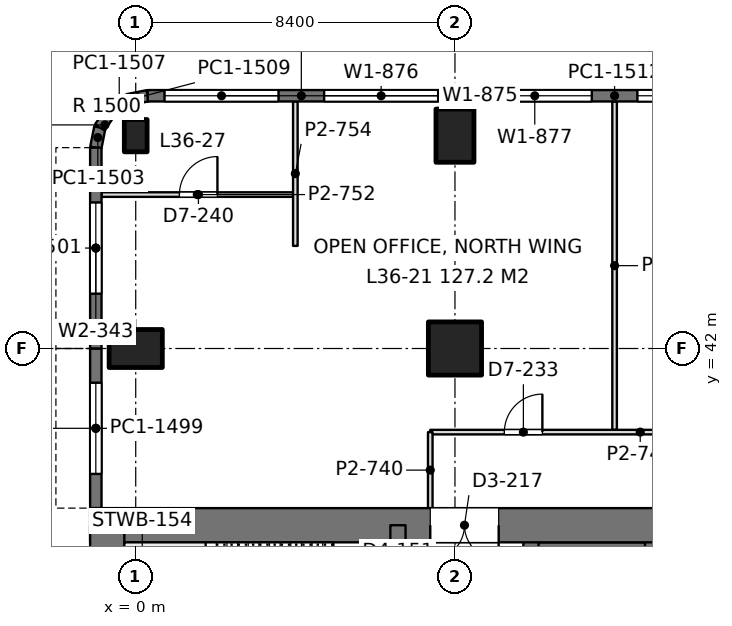
"""IFC4 building model, lengths in metres.
Left out: names, types, materials, properties, quantities, classifications, styles, units other than length and angle.
Written with IfcOpenShell. Run it as: python <this file> out.ifc"""

import sys

from ifc_helpers import new_model, si_unit, direction, frame, frame_2d, origin, origin_2d, place, context, subcontext, project, spatial, rectangle, extrude, element, fill, save


model = new_model("IFC4")
c1 = context("Model", 3, precision=1e-05, world=origin(), true_north=direction((0.0, 1.0)))
c2 = subcontext(c1, "Body", "Model", "MODEL_VIEW")
j1 = project(units=[si_unit("LENGTHUNIT", "METRE"), si_unit("PLANEANGLEUNIT", "RADIAN")], contexts=[c1])
p1 = place(None, origin())
s1 = spatial("IfcSite", under=j1, at=p1, CompositionType="ELEMENT")
p2 = place(p1, origin())
s2 = spatial("IfcBuilding", under=s1, at=p2, CompositionType="ELEMENT")
p3 = place(p2, frame((0.0, 0.0, 159.6)))
s3 = spatial("IfcBuildingStorey", under=s2, at=p3, CompositionType="ELEMENT", Elevation=159.6)
p4 = place(p3, frame((0.0, 42.0, 0.0), z_axis=(0.0, 0.0, 1.0), x_axis=(0.0, 1.0, 0.0)))
e1 = element("IfcColumn", 1, at=p4, inside=s3, PredefinedType="COLUMN", context=c2, shape_type="SweptSolid", body=[
    extrude(rectangle(XDim=1.0, YDim=1.4, at=origin_2d()), origin(), (0.0, 0.0, 1.0), 4.2),
])
p5 = place(p3, frame((0.0, 47.6, 0.0), z_axis=(0.0, 0.0, 1.0), x_axis=(1.0, 0.0, 0.0)))
e2 = element("IfcColumn", 2, at=p5, inside=s3, PredefinedType="COLUMN", context=c2, shape_type="SweptSolid", body=[
    extrude(rectangle(XDim=0.6, YDim=0.85, at=origin_2d()), origin(), (0.0, 0.0, 1.0), 4.2),
])
p6 = place(p3, frame((8.4, 42.0, 0.0), z_axis=(0.0, 0.0, 1.0), x_axis=(1.0, 0.0, 0.0)))
e3 = element("IfcColumn", 3, at=p6, inside=s3, PredefinedType="COLUMN", context=c2, shape_type="SweptSolid", body=[
    extrude(rectangle(XDim=1.4, YDim=1.4, at=origin_2d()), origin(), (0.0, 0.0, 1.0), 4.2),
])
p7 = place(p3, frame((8.4, 47.6, 0.0), z_axis=(0.0, 0.0, 1.0), x_axis=(1.0, 0.0, 0.0)))
e4 = element("IfcColumn", 4, at=p7, inside=s3, PredefinedType="COLUMN", context=c2, shape_type="SweptSolid", body=[
    extrude(rectangle(XDim=1.0, YDim=1.4, at=origin_2d()), origin(), (0.0, 0.0, 1.0), 4.2),
])
p8 = place(p3, frame((-1.2, 37.35, 0.0), z_axis=(0.0, 0.0, 1.0), x_axis=(1.0, 0.0, 0.0)))
e5 = element("IfcWall", 5, at=p8, inside=s3, PredefinedType="SHEAR", context=c2, shape_type="SweptSolid", body=[
    extrude(rectangle(XDim=18.0, YDim=0.9, at=frame_2d((9.0, 0.0))), origin(), (0.0, 0.0, 1.0), 4.2),
])
p9 = place(p8, frame((8.95, 0.0, 0.0)))
e6 = element("IfcOpeningElement", 6, at=p9, cuts=e5, PredefinedType="OPENING", context=c2, shape_type="SweptSolid", body=[
    extrude(rectangle(XDim=1.8, YDim=2.4, at=frame_2d((0.9, 1.2))), frame((0.0, 0.46, 0.0), z_axis=(0.0, -1.0, 0.0), x_axis=(1.0, 0.0, 0.0)), (0.0, 0.0, 1.0), 0.92),
])
p10 = place(p3, frame((-0.75, 13.05, 0.0), z_axis=(0.0, 0.0, 1.0), x_axis=(0.0, 1.0, 0.0)))
e7 = element("IfcWall", 7, at=p10, inside=s3, PredefinedType="SHEAR", context=c2, shape_type="SweptSolid", body=[
    extrude(rectangle(XDim=24.3, YDim=0.9, at=frame_2d((12.15, 0.0))), origin(), (0.0, 0.0, 1.0), 4.2),
])
p11 = place(p3, frame((6.9, 13.05, 0.0), z_axis=(0.0, 0.0, 1.0), x_axis=(0.0, 1.0, 0.0)))
e8 = element("IfcWall", 8, at=p11, inside=s3, PredefinedType="SHEAR", context=c2, shape_type="SweptSolid", body=[
    extrude(rectangle(XDim=24.3, YDim=0.4, at=frame_2d((12.15, 0.0))), origin(), (0.0, 0.0, 1.0), 4.2),
])
p12 = place(p11, frame((1.3, 0.0, 0.0)))
e9 = element("IfcOpeningElement", 9, at=p12, cuts=e8, PredefinedType="OPENING", context=c2, shape_type="SweptSolid", body=[
    extrude(rectangle(XDim=1.0, YDim=2.2, at=frame_2d((0.5, 1.1))), frame((0.0, 0.21, 0.0), z_axis=(0.0, -1.0, 0.0), x_axis=(1.0, 0.0, 0.0)), (0.0, 0.0, 1.0), 0.42),
])
p13 = place(p11, frame((22.0, 0.0, 0.0)))
e10 = element("IfcOpeningElement", 10, at=p13, cuts=e8, PredefinedType="OPENING", context=c2, shape_type="SweptSolid", body=[
    extrude(rectangle(XDim=1.0, YDim=2.2, at=frame_2d((0.5, 1.1))), frame((0.0, 0.21, 0.0), z_axis=(0.0, -1.0, 0.0), x_axis=(1.0, 0.0, 0.0)), (0.0, 0.0, 1.0), 0.42),
])
p14 = place(p11, frame((5.55, 0.0, 0.0)))
e11 = element("IfcOpeningElement", 11, at=p14, cuts=e8, PredefinedType="OPENING", context=c2, shape_type="SweptSolid", body=[
    extrude(rectangle(XDim=1.0, YDim=2.2, at=frame_2d((0.5, 1.1))), frame((0.0, 0.21, 0.0), z_axis=(0.0, -1.0, 0.0), x_axis=(1.0, 0.0, 0.0)), (0.0, 0.0, 1.0), 0.42),
])
p15 = place(p11, frame((9.55, 0.0, 0.0)))
e12 = element("IfcOpeningElement", 12, at=p15, cuts=e8, PredefinedType="OPENING", context=c2, shape_type="SweptSolid", body=[
    extrude(rectangle(XDim=1.0, YDim=2.2, at=frame_2d((0.5, 1.1))), frame((0.0, 0.21, 0.0), z_axis=(0.0, -1.0, 0.0), x_axis=(1.0, 0.0, 0.0)), (0.0, 0.0, 1.0), 0.42),
])
p16 = place(p11, frame((12.8, 0.0, 0.0)))
e13 = element("IfcOpeningElement", 13, at=p16, cuts=e8, PredefinedType="OPENING", context=c2, shape_type="SweptSolid", body=[
    extrude(rectangle(XDim=1.1, YDim=2.2, at=frame_2d((0.55, 1.1))), frame((0.0, 0.21, 0.0), z_axis=(0.0, -1.0, 0.0), x_axis=(1.0, 0.0, 0.0)), (0.0, 0.0, 1.0), 0.42),
])
p17 = place(p11, frame((15.538, 0.0, 0.0)))
e14 = element("IfcOpeningElement", 14, at=p17, cuts=e8, PredefinedType="OPENING", context=c2, shape_type="SweptSolid", body=[
    extrude(rectangle(XDim=1.1, YDim=2.2, at=frame_2d((0.55, 1.1))), frame((0.0, 0.21, 0.0), z_axis=(0.0, -1.0, 0.0), x_axis=(1.0, 0.0, 0.0)), (0.0, 0.0, 1.0), 0.42),
])
p18 = place(p11, frame((18.262, 0.0, 0.0)))
e15 = element("IfcOpeningElement", 15, at=p18, cuts=e8, PredefinedType="OPENING", context=c2, shape_type="SweptSolid", body=[
    extrude(rectangle(XDim=1.1, YDim=2.2, at=frame_2d((0.55, 1.1))), frame((0.0, 0.21, 0.0), z_axis=(0.0, -1.0, 0.0), x_axis=(1.0, 0.0, 0.0)), (0.0, 0.0, 1.0), 0.42),
])
p19 = place(p3, frame((10.4, 13.05, 0.0), z_axis=(0.0, 0.0, 1.0), x_axis=(0.0, 1.0, 0.0)))
e16 = element("IfcWall", 16, at=p19, inside=s3, PredefinedType="SHEAR", context=c2, shape_type="SweptSolid", body=[
    extrude(rectangle(XDim=24.3, YDim=0.4, at=frame_2d((12.15, 0.0))), origin(), (0.0, 0.0, 1.0), 4.2),
])
p20 = place(p19, frame((10.05, 0.0, 0.0)))
e17 = element("IfcOpeningElement", 17, at=p20, cuts=e16, PredefinedType="OPENING", context=c2, shape_type="SweptSolid", body=[
    extrude(rectangle(XDim=1.1, YDim=2.2, at=frame_2d((0.55, 1.1))), frame((0.0, 0.21, 0.0), z_axis=(0.0, -1.0, 0.0), x_axis=(1.0, 0.0, 0.0)), (0.0, 0.0, 1.0), 0.42),
])
p21 = place(p19, frame((12.9, 0.0, 0.0)))
e18 = element("IfcOpeningElement", 18, at=p21, cuts=e16, PredefinedType="OPENING", context=c2, shape_type="SweptSolid", body=[
    extrude(rectangle(XDim=1.1, YDim=2.2, at=frame_2d((0.55, 1.1))), frame((0.0, 0.21, 0.0), z_axis=(0.0, -1.0, 0.0), x_axis=(1.0, 0.0, 0.0)), (0.0, 0.0, 1.0), 0.42),
])
p22 = place(p19, frame((21.45, 0.0, 0.0)))
e19 = element("IfcOpeningElement", 19, at=p22, cuts=e16, PredefinedType="OPENING", context=c2, shape_type="SweptSolid", body=[
    extrude(rectangle(XDim=1.1, YDim=2.2, at=frame_2d((0.55, 1.1))), frame((0.0, 0.21, 0.0), z_axis=(0.0, -1.0, 0.0), x_axis=(1.0, 0.0, 0.0)), (0.0, 0.0, 1.0), 0.42),
])
p23 = place(p19, frame((2.05, 0.0, 0.0)))
e20 = element("IfcOpeningElement", 20, at=p23, cuts=e16, PredefinedType="OPENING", context=c2, shape_type="SweptSolid", body=[
    extrude(rectangle(XDim=1.8, YDim=2.4, at=frame_2d((0.9, 1.2))), frame((0.0, 0.21, 0.0), z_axis=(0.0, -1.0, 0.0), x_axis=(1.0, 0.0, 0.0)), (0.0, 0.0, 1.0), 0.42),
])
p24 = place(p19, frame((5.8, 0.0, 0.0)))
e21 = element("IfcOpeningElement", 21, at=p24, cuts=e16, PredefinedType="OPENING", context=c2, shape_type="SweptSolid", body=[
    extrude(rectangle(XDim=1.8, YDim=2.4, at=frame_2d((0.9, 1.2))), frame((0.0, 0.21, 0.0), z_axis=(0.0, -1.0, 0.0), x_axis=(1.0, 0.0, 0.0)), (0.0, 0.0, 1.0), 0.42),
])
p25 = place(p3, frame((13.6, 22.225, 0.0), z_axis=(0.0, 0.0, 1.0), x_axis=(0.0, 1.0, 0.0)))
e22 = element("IfcWall", 22, at=p25, inside=s3, PredefinedType="SHEAR", context=c2, shape_type="SweptSolid", body=[
    extrude(rectangle(XDim=15.125, YDim=0.4, at=frame_2d((7.562, 0.0))), origin(), (0.0, 0.0, 1.0), 4.2),
])
p26 = place(p3, frame((10.4, 36.625, 0.0), z_axis=(0.0, 0.0, 1.0), x_axis=(1.0, 0.0, 0.0)))
e23 = element("IfcWall", 23, at=p26, inside=s3, PredefinedType="SHEAR", context=c2, shape_type="SweptSolid", body=[
    extrude(rectangle(XDim=3.2, YDim=0.55, at=frame_2d((1.6, 0.0))), origin(), (0.0, 0.0, 1.0), 4.2),
])
p27 = place(p3, frame((-1.05, 37.8, 0.0), z_axis=(0.0, 0.0, 1.0), x_axis=(0.0, 1.0, 0.0)))
e24 = element("IfcWall", 24, at=p27, inside=s3, PredefinedType="SOLIDWALL", context=c2, shape_type="SweptSolid", body=[
    extrude(rectangle(XDim=4.2, YDim=0.3, at=frame_2d((2.1, 0.0))), origin(), (0.0, 0.0, 1.0), 4.05),
])
p28 = place(p27, frame((0.9, 0.0, 0.9)))
e25 = element("IfcOpeningElement", 25, at=p28, cuts=e24, PredefinedType="OPENING", context=c2, shape_type="SweptSolid", body=[
    extrude(rectangle(XDim=2.4, YDim=1.9, at=frame_2d((1.2, 0.95))), frame((0.0, 0.16, 0.0), z_axis=(0.0, -1.0, 0.0), x_axis=(1.0, 0.0, 0.0)), (0.0, 0.0, 1.0), 0.32),
])
p29 = place(p3, frame((-1.05, 42.0, 0.0), z_axis=(0.0, 0.0, 1.0), x_axis=(0.0, 1.0, 0.0)))
e26 = element("IfcWall", 26, at=p29, inside=s3, PredefinedType="SOLIDWALL", context=c2, shape_type="SweptSolid", body=[
    extrude(rectangle(XDim=5.285, YDim=0.3, at=frame_2d((2.643, 0.0))), origin(), (0.0, 0.0, 1.0), 4.05),
])
p30 = place(p29, frame((1.443, 0.0, 0.9)))
e27 = element("IfcOpeningElement", 27, at=p30, cuts=e26, PredefinedType="OPENING", context=c2, shape_type="SweptSolid", body=[
    extrude(rectangle(XDim=2.4, YDim=1.9, at=frame_2d((1.2, 0.95))), frame((0.0, 0.16, 0.0), z_axis=(0.0, -1.0, 0.0), x_axis=(1.0, 0.0, 0.0)), (0.0, 0.0, 1.0), 0.32),
])
p31 = place(p3, frame((-1.05, 47.285, 0.0), z_axis=(0.0, 0.0, 1.0), x_axis=(0.195073962632, 0.980788534345, 0.0)))
e28 = element("IfcWall", 28, at=p31, inside=s3, PredefinedType="SOLIDWALL", context=c2, shape_type="SweptSolid", body=[
    extrude(rectangle(XDim=0.541, YDim=0.3, at=frame_2d((0.271, 0.0))), origin(), (0.0, 0.0, 1.0), 4.05),
])
p32 = place(p3, frame((-0.945, 47.815, 0.0), z_axis=(0.0, 0.0, 1.0), x_axis=(0.55534295404, 0.831621430339, 0.0)))
e29 = element("IfcWall", 29, at=p32, inside=s3, PredefinedType="SOLIDWALL", context=c2, shape_type="SweptSolid", body=[
    extrude(rectangle(XDim=0.526, YDim=0.3, at=frame_2d((0.263, 0.0))), origin(), (0.0, 0.0, 1.0), 4.05),
])
p33 = place(p3, frame((-0.653, 48.253, 0.0), z_axis=(0.0, 0.0, 1.0), x_axis=(0.831692711774, 0.555236195849, 0.0)))
e30 = element("IfcWall", 30, at=p33, inside=s3, PredefinedType="SOLIDWALL", context=c2, shape_type="SweptSolid", body=[
    extrude(rectangle(XDim=0.525, YDim=0.3, at=frame_2d((0.263, 0.0))), origin(), (0.0, 0.0, 1.0), 4.05),
])
p34 = place(p3, frame((-0.216, 48.544, 0.0), z_axis=(0.0, 0.0, 1.0), x_axis=(0.980788534345, 0.195073962632, 0.0)))
e31 = element("IfcWall", 31, at=p34, inside=s3, PredefinedType="SOLIDWALL", context=c2, shape_type="SweptSolid", body=[
    extrude(rectangle(XDim=0.541, YDim=0.3, at=frame_2d((0.271, 0.0))), origin(), (0.0, 0.0, 1.0), 4.05),
])
p35 = place(p3, frame((0.315, 48.65, 0.0), z_axis=(0.0, 0.0, 1.0), x_axis=(1.0, 0.0, 0.0)))
e32 = element("IfcWall", 32, at=p35, inside=s3, PredefinedType="SOLIDWALL", context=c2, shape_type="SweptSolid", body=[
    extrude(rectangle(XDim=8.085, YDim=0.3, at=frame_2d((4.042, 0.0))), origin(), (0.0, 0.0, 1.0), 4.05),
])
p36 = place(p35, frame((0.443, 0.0, 0.9)))
e33 = element("IfcOpeningElement", 33, at=p36, cuts=e32, PredefinedType="OPENING", context=c2, shape_type="SweptSolid", body=[
    extrude(rectangle(XDim=3.0, YDim=1.9, at=frame_2d((1.5, 0.95))), frame((0.0, 0.16, 0.0), z_axis=(0.0, -1.0, 0.0), x_axis=(1.0, 0.0, 0.0)), (0.0, 0.0, 1.0), 0.32),
])
p37 = place(p35, frame((4.643, 0.0, 0.9)))
e34 = element("IfcOpeningElement", 34, at=p37, cuts=e32, PredefinedType="OPENING", context=c2, shape_type="SweptSolid", body=[
    extrude(rectangle(XDim=3.0, YDim=1.9, at=frame_2d((1.5, 0.95))), frame((0.0, 0.16, 0.0), z_axis=(0.0, -1.0, 0.0), x_axis=(1.0, 0.0, 0.0)), (0.0, 0.0, 1.0), 0.32),
])
p38 = place(p3, frame((8.4, 48.65, 0.0), z_axis=(0.0, 0.0, 1.0), x_axis=(1.0, 0.0, 0.0)))
e35 = element("IfcWall", 35, at=p38, inside=s3, PredefinedType="SOLIDWALL", context=c2, shape_type="SweptSolid", body=[
    extrude(rectangle(XDim=8.4, YDim=0.3, at=frame_2d((4.2, 0.0))), origin(), (0.0, 0.0, 1.0), 4.05),
])
p39 = place(p38, frame((0.6, 0.0, 0.9)))
e36 = element("IfcOpeningElement", 36, at=p39, cuts=e35, PredefinedType="OPENING", context=c2, shape_type="SweptSolid", body=[
    extrude(rectangle(XDim=3.0, YDim=1.9, at=frame_2d((1.5, 0.95))), frame((0.0, 0.16, 0.0), z_axis=(0.0, -1.0, 0.0), x_axis=(1.0, 0.0, 0.0)), (0.0, 0.0, 1.0), 0.32),
])
p40 = place(p38, frame((4.8, 0.0, 0.9)))
e37 = element("IfcOpeningElement", 37, at=p40, cuts=e35, PredefinedType="OPENING", context=c2, shape_type="SweptSolid", body=[
    extrude(rectangle(XDim=3.0, YDim=1.9, at=frame_2d((1.5, 0.95))), frame((0.0, 0.16, 0.0), z_axis=(0.0, -1.0, 0.0), x_axis=(1.0, 0.0, 0.0)), (0.0, 0.0, 1.0), 0.32),
])
p41 = place(p3, frame((-0.902, 46.05, 0.0), z_axis=(0.0, 0.0, 1.0), x_axis=(1.0, 0.0, 0.0)))
e38 = element("IfcWall", 38, at=p41, inside=s3, PredefinedType="PARTITIONING", context=c2, shape_type="SweptSolid", body=[
    extrude(rectangle(XDim=5.044, YDim=0.12, at=frame_2d((2.522, 0.0))), origin(), (0.0, 0.0, 1.0), 3.56),
])
p42 = place(p41, frame((2.052, 0.0, 0.0)))
e39 = element("IfcOpeningElement", 39, at=p42, cuts=e38, PredefinedType="OPENING", context=c2, shape_type="SweptSolid", body=[
    extrude(rectangle(XDim=1.0, YDim=2.4, at=frame_2d((0.5, 1.2))), frame((0.0, 0.07, 0.0), z_axis=(0.0, -1.0, 0.0), x_axis=(1.0, 0.0, 0.0)), (0.0, 0.0, 1.0), 0.14),
])
p43 = place(p3, frame((4.2, 44.7, 0.0), z_axis=(0.0, 0.0, 1.0), x_axis=(0.0, 1.0, 0.0)))
e40 = element("IfcWall", 40, at=p43, inside=s3, PredefinedType="PARTITIONING", context=c2, shape_type="SweptSolid", body=[
    extrude(rectangle(XDim=3.802, YDim=0.12, at=frame_2d((1.901, 0.0))), origin(), (0.0, 0.0, 1.0), 3.56),
])
p44 = place(p3, frame((12.6, 39.858, 0.0), z_axis=(0.0, 0.0, 1.0), x_axis=(0.0, 1.0, 0.0)))
e41 = element("IfcWall", 41, at=p44, inside=s3, PredefinedType="PARTITIONING", context=c2, shape_type="SweptSolid", body=[
    extrude(rectangle(XDim=8.644, YDim=0.12, at=frame_2d((4.322, 0.0))), origin(), (0.0, 0.0, 1.0), 3.55),
])
p45 = place(p3, frame((7.75, 39.8, 0.0), z_axis=(0.0, 0.0, 1.0), x_axis=(1.0, 0.0, 0.0)))
e42 = element("IfcWall", 42, at=p45, inside=s3, PredefinedType="PARTITIONING", context=c2, shape_type="SweptSolid", body=[
    extrude(rectangle(XDim=11.05, YDim=0.12, at=frame_2d((5.525, 0.0))), origin(), (0.0, 0.0, 1.0), 3.69),
])
p46 = place(p45, frame((1.95, 0.0, 0.0)))
e43 = element("IfcOpeningElement", 43, at=p46, cuts=e42, PredefinedType="OPENING", context=c2, shape_type="SweptSolid", body=[
    extrude(rectangle(XDim=1.0, YDim=2.4, at=frame_2d((0.5, 1.2))), frame((0.0, 0.07, 0.0), z_axis=(0.0, -1.0, 0.0), x_axis=(1.0, 0.0, 0.0)), (0.0, 0.0, 1.0), 0.14),
])
p47 = place(p45, frame((6.95, 0.0, 0.0)))
e44 = element("IfcOpeningElement", 44, at=p47, cuts=e42, PredefinedType="OPENING", context=c2, shape_type="SweptSolid", body=[
    extrude(rectangle(XDim=1.8, YDim=2.2, at=frame_2d((0.9, 1.1))), frame((0.0, 0.07, 0.0), z_axis=(0.0, -1.0, 0.0), x_axis=(1.0, 0.0, 0.0)), (0.0, 0.0, 1.0), 0.14),
])
p48 = place(p3, frame((7.75, 37.8, 0.0), z_axis=(0.0, 0.0, 1.0), x_axis=(0.0, 1.0, 0.0)))
e45 = element("IfcWall", 45, at=p48, inside=s3, PredefinedType="PARTITIONING", context=c2, shape_type="SweptSolid", body=[
    extrude(rectangle(XDim=2.0, YDim=0.12, at=frame_2d((1.0, 0.0))), origin(), (0.0, 0.0, 1.0), 4.05),
])
p49 = place(p28, origin())
e46 = element("IfcWindow", 46, at=p49, inside=s3, PartitioningType="SINGLE_PANEL", PredefinedType="WINDOW", context=c2, shape_type="SweptSolid", body=[
    extrude(rectangle(XDim=2.4, YDim=1.9, at=frame_2d((1.2, 0.95))), frame((0.0, 0.03, 0.0), z_axis=(0.0, -1.0, 0.0), x_axis=(1.0, 0.0, 0.0)), (0.0, 0.0, 1.0), 0.06),
])
fill(e25, e46)
p50 = place(p30, origin())
e47 = element("IfcWindow", 47, at=p50, inside=s3, PartitioningType="SINGLE_PANEL", PredefinedType="WINDOW", context=c2, shape_type="SweptSolid", body=[
    extrude(rectangle(XDim=2.4, YDim=1.9, at=frame_2d((1.2, 0.95))), frame((0.0, 0.03, 0.0), z_axis=(0.0, -1.0, 0.0), x_axis=(1.0, 0.0, 0.0)), (0.0, 0.0, 1.0), 0.06),
])
fill(e27, e47)
p51 = place(p36, origin())
e48 = element("IfcWindow", 48, at=p51, inside=s3, PartitioningType="SINGLE_PANEL", PredefinedType="WINDOW", context=c2, shape_type="SweptSolid", body=[
    extrude(rectangle(XDim=3.0, YDim=1.9, at=frame_2d((1.5, 0.95))), frame((0.0, 0.03, 0.0), z_axis=(0.0, -1.0, 0.0), x_axis=(1.0, 0.0, 0.0)), (0.0, 0.0, 1.0), 0.06),
])
fill(e33, e48)
p52 = place(p37, origin())
e49 = element("IfcWindow", 49, at=p52, inside=s3, PartitioningType="SINGLE_PANEL", PredefinedType="WINDOW", context=c2, shape_type="SweptSolid", body=[
    extrude(rectangle(XDim=3.0, YDim=1.9, at=frame_2d((1.5, 0.95))), frame((0.0, 0.03, 0.0), z_axis=(0.0, -1.0, 0.0), x_axis=(1.0, 0.0, 0.0)), (0.0, 0.0, 1.0), 0.06),
])
fill(e34, e49)
p53 = place(p39, origin())
e50 = element("IfcWindow", 50, at=p53, inside=s3, PartitioningType="SINGLE_PANEL", PredefinedType="WINDOW", context=c2, shape_type="SweptSolid", body=[
    extrude(rectangle(XDim=3.0, YDim=1.9, at=frame_2d((1.5, 0.95))), frame((0.0, 0.03, 0.0), z_axis=(0.0, -1.0, 0.0), x_axis=(1.0, 0.0, 0.0)), (0.0, 0.0, 1.0), 0.06),
])
fill(e36, e50)
p54 = place(p40, origin())
e51 = element("IfcWindow", 51, at=p54, inside=s3, PartitioningType="SINGLE_PANEL", PredefinedType="WINDOW", context=c2, shape_type="SweptSolid", body=[
    extrude(rectangle(XDim=3.0, YDim=1.9, at=frame_2d((1.5, 0.95))), frame((0.0, 0.03, 0.0), z_axis=(0.0, -1.0, 0.0), x_axis=(1.0, 0.0, 0.0)), (0.0, 0.0, 1.0), 0.06),
])
fill(e37, e51)
p55 = place(p9, frame((1.8, 0.0, 0.0), z_axis=(0.0, 0.0, 1.0), x_axis=(-1.0, 0.0, 0.0)))
e52 = element("IfcDoor", 52, at=p55, inside=s3, OperationType="DOUBLE_DOOR_SINGLE_SWING", PredefinedType="DOOR", context=c2, shape_type="SweptSolid", body=[
    extrude(rectangle(XDim=1.8, YDim=2.4, at=frame_2d((0.9, 1.2))), frame((0.0, 0.025, 0.0), z_axis=(0.0, -1.0, 0.0), x_axis=(1.0, 0.0, 0.0)), (0.0, 0.0, 1.0), 0.05),
])
fill(e6, e52)
p56 = place(p42, origin())
e53 = element("IfcDoor", 53, at=p56, inside=s3, OperationType="SINGLE_SWING_RIGHT", PredefinedType="DOOR", context=c2, shape_type="SweptSolid", body=[
    extrude(rectangle(XDim=1.0, YDim=2.4, at=frame_2d((0.5, 1.2))), frame((0.0, 0.025, 0.0), z_axis=(0.0, -1.0, 0.0), x_axis=(1.0, 0.0, 0.0)), (0.0, 0.0, 1.0), 0.05),
])
fill(e39, e53)
p57 = place(p46, origin())
e54 = element("IfcDoor", 54, at=p57, inside=s3, OperationType="SINGLE_SWING_RIGHT", PredefinedType="DOOR", context=c2, shape_type="SweptSolid", body=[
    extrude(rectangle(XDim=1.0, YDim=2.4, at=frame_2d((0.5, 1.2))), frame((0.0, 0.025, 0.0), z_axis=(0.0, -1.0, 0.0), x_axis=(1.0, 0.0, 0.0)), (0.0, 0.0, 1.0), 0.05),
])
fill(e43, e54)
save(model, sys.argv[1])
